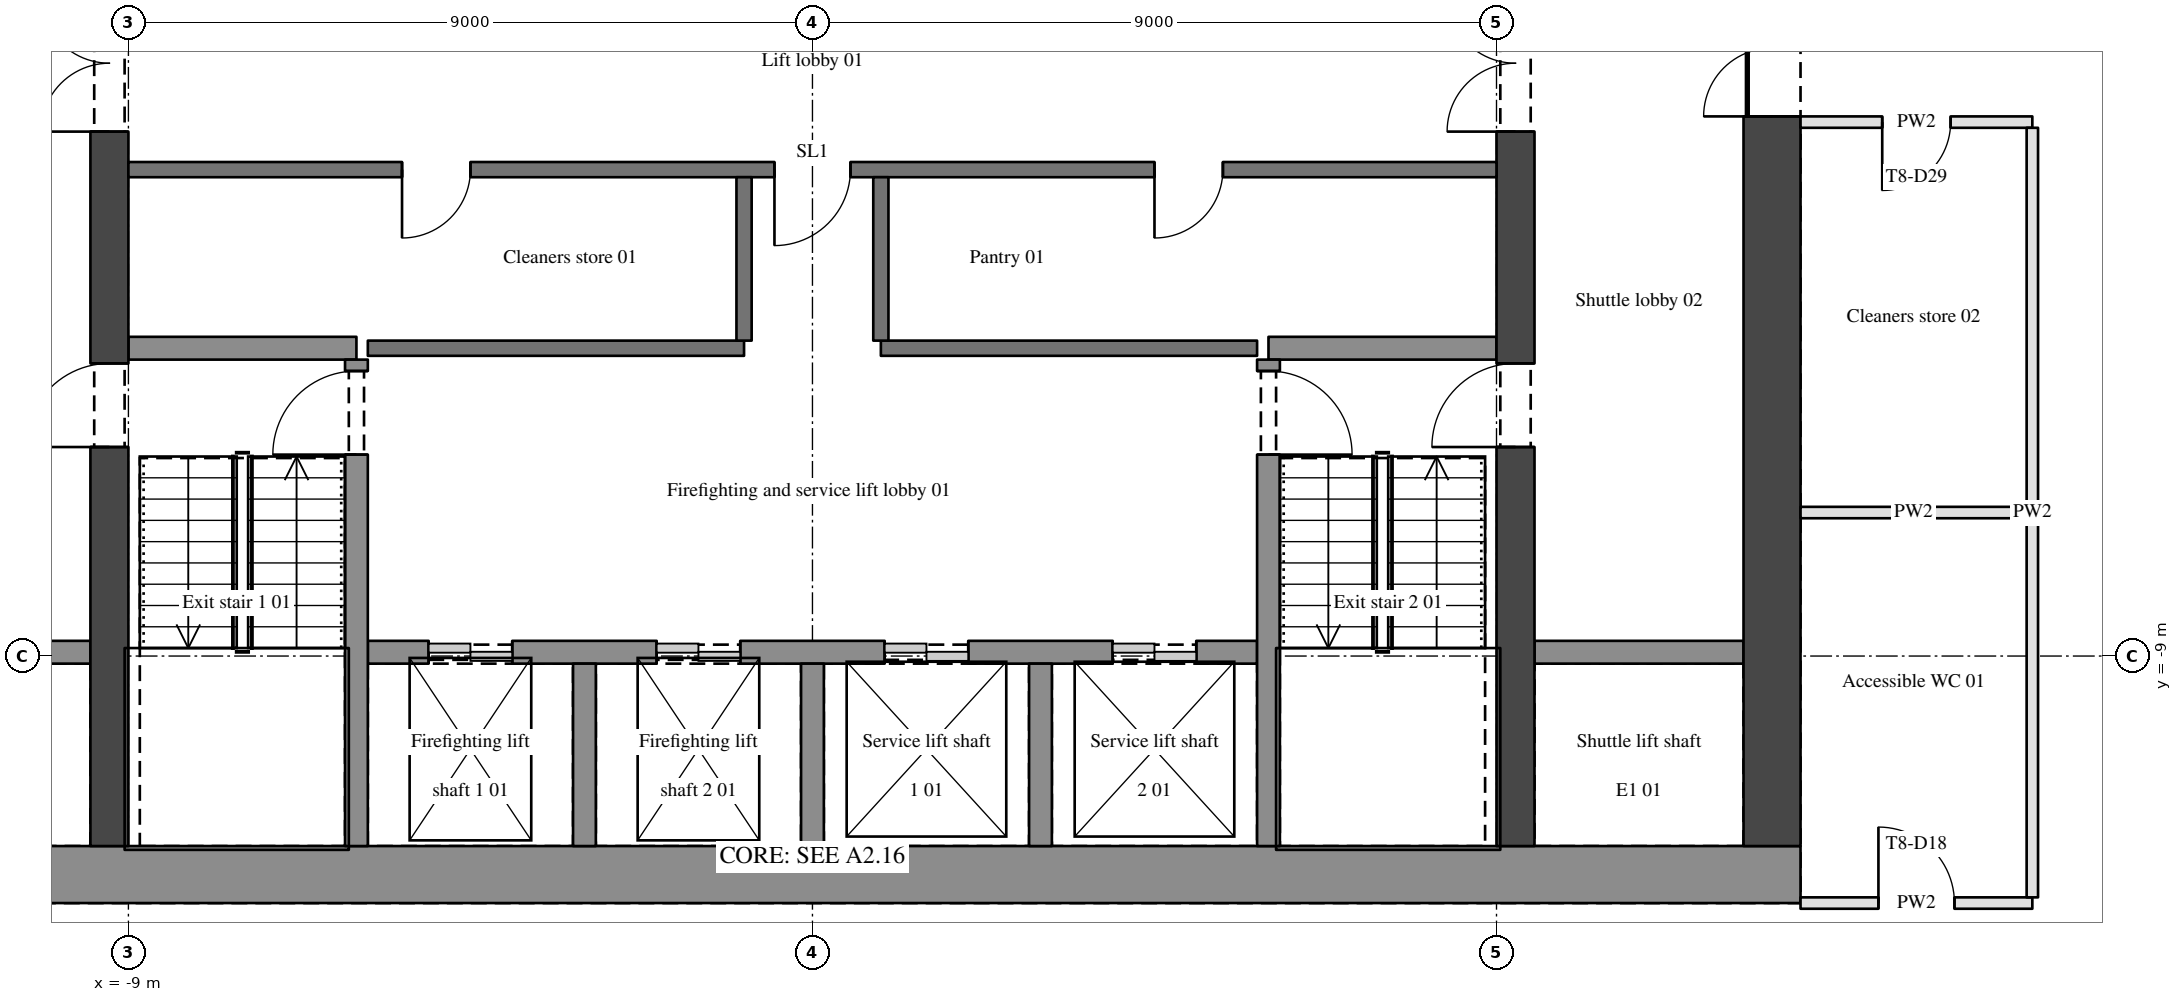
"""IFC4 building model, lengths in metres.
Left out: names, types, materials, properties, quantities, classifications, styles, units other than length and angle.
Written with IfcOpenShell. Run it as: python <this file> out.ifc"""

import sys

from ifc_helpers import new_model, si_unit, direction, frame, frame_2d, origin, place, context, subcontext, project, spatial, rectangle, extrude, element, fill, save


model = new_model("IFC4")
c1 = context("Model", 3, precision=1e-05, world=origin(), true_north=direction((0.0, 1.0)))
c2 = subcontext(c1, "Body", "Model", "MODEL_VIEW")
j1 = project(units=[si_unit("LENGTHUNIT", "METRE"), si_unit("PLANEANGLEUNIT", "RADIAN")], contexts=[c1])
p1 = place(None, origin())
s1 = spatial("IfcSite", under=j1, at=p1, CompositionType="ELEMENT")
p2 = place(p1, origin())
s2 = spatial("IfcBuilding", under=s1, at=p2, CompositionType="ELEMENT")
p3 = place(p2, frame((0.0, 0.0, 121.5)))
s3 = spatial("IfcBuildingStorey", under=s2, at=p3, CompositionType="ELEMENT", Elevation=121.5)
p4 = place(p3, frame((-13.0, -11.875, 0.0), z_axis=(0.0, 0.0, 1.0), x_axis=(1.0, 0.0, 0.0)))
e1 = element("IfcWall", 1, at=p4, inside=s3, PredefinedType="SHEAR", context=c2, shape_type="SweptSolid", body=[
    extrude(rectangle(XDim=26.0, YDim=0.75, at=frame_2d((13.0, 0.0))), origin(), (0.0, 0.0, 1.0), 3.4),
])
p5 = place(p3, frame((12.625, -11.5, 0.0), z_axis=(0.0, 0.0, 1.0), x_axis=(0.0, 1.0, 0.0)))
e2 = element("IfcWall", 2, at=p5, inside=s3, PredefinedType="SHEAR", context=c2, shape_type="SweptSolid", body=[
    extrude(rectangle(XDim=14.65, YDim=0.75, at=frame_2d((7.325, 0.0))), origin(), (0.0, 0.0, 1.0), 3.4),
])
p6 = place(p5, frame((9.6, 0.0, 0.0)))
e3 = element("IfcOpeningElement", 3, at=p6, cuts=e2, PredefinedType="OPENING", context=c2, shape_type="SweptSolid", body=[
    extrude(rectangle(XDim=1.8, YDim=2.1, at=frame_2d((0.9, 1.05))), frame((0.0, 0.385, 0.0), z_axis=(0.0, -1.0, 0.0), x_axis=(1.0, 0.0, 0.0)), (0.0, 0.0, 1.0), 0.77),
])
p7 = place(p3, frame((-9.25, -11.5, 0.0), z_axis=(0.0, 0.0, 1.0), x_axis=(0.0, 1.0, 0.0)))
e4 = element("IfcWall", 4, at=p7, inside=s3, PredefinedType="SHEAR", context=c2, shape_type="SweptSolid", body=[
    extrude(rectangle(XDim=11.65, YDim=0.5, at=frame_2d((5.825, 0.0))), origin(), (0.0, 0.0, 1.0), 3.4),
])
p8 = place(p7, frame((9.4, 0.0, 0.0)))
e5 = element("IfcOpeningElement", 5, at=p8, cuts=e4, PredefinedType="OPENING", context=c2, shape_type="SweptSolid", body=[
    extrude(rectangle(XDim=1.8, YDim=2.1, at=frame_2d((0.9, 1.05))), frame((0.0, 0.26, 0.0), z_axis=(0.0, -1.0, 0.0), x_axis=(1.0, 0.0, 0.0)), (0.0, 0.0, 1.0), 0.52),
])
p9 = place(p7, frame((5.25, 0.0, 0.0)))
e6 = element("IfcOpeningElement", 6, at=p9, cuts=e4, PredefinedType="OPENING", context=c2, shape_type="SweptSolid", body=[
    extrude(rectangle(XDim=1.1, YDim=2.1, at=frame_2d((0.55, 1.05))), frame((0.0, 0.26, 0.0), z_axis=(0.0, -1.0, 0.0), x_axis=(1.0, 0.0, 0.0)), (0.0, 0.0, 1.0), 0.52),
])
p10 = place(p3, frame((9.25, -11.5, 0.0), z_axis=(0.0, 0.0, 1.0), x_axis=(0.0, 1.0, 0.0)))
e7 = element("IfcWall", 7, at=p10, inside=s3, PredefinedType="SHEAR", context=c2, shape_type="SweptSolid", body=[
    extrude(rectangle(XDim=11.65, YDim=0.5, at=frame_2d((5.825, 0.0))), origin(), (0.0, 0.0, 1.0), 3.4),
])
p11 = place(p10, frame((9.4, 0.0, 0.0)))
e8 = element("IfcOpeningElement", 8, at=p11, cuts=e7, PredefinedType="OPENING", context=c2, shape_type="SweptSolid", body=[
    extrude(rectangle(XDim=1.8, YDim=2.1, at=frame_2d((0.9, 1.05))), frame((0.0, 0.26, 0.0), z_axis=(0.0, -1.0, 0.0), x_axis=(1.0, 0.0, 0.0)), (0.0, 0.0, 1.0), 0.52),
])
p12 = place(p10, frame((5.25, 0.0, 0.0)))
e9 = element("IfcOpeningElement", 9, at=p12, cuts=e7, PredefinedType="OPENING", context=c2, shape_type="SweptSolid", body=[
    extrude(rectangle(XDim=1.1, YDim=2.1, at=frame_2d((0.55, 1.05))), frame((0.0, 0.26, 0.0), z_axis=(0.0, -1.0, 0.0), x_axis=(1.0, 0.0, 0.0)), (0.0, 0.0, 1.0), 0.52),
])
p13 = place(p3, frame((13.0, -12.25, 0.0), z_axis=(0.0, 0.0, 1.0), x_axis=(1.0, 0.0, 0.0)))
e10 = element("IfcWall", 10, at=p13, inside=s3, PredefinedType="PARTITIONING", context=c2, shape_type="SweptSolid", body=[
    extrude(rectangle(XDim=3.05, YDim=0.15, at=frame_2d((1.525, 0.0))), origin(), (0.0, 0.0, 1.0), 2.46),
])
p14 = place(p13, frame((1.025, 0.0, 0.0)))
e11 = element("IfcOpeningElement", 11, at=p14, cuts=e10, PredefinedType="OPENING", context=c2, shape_type="SweptSolid", body=[
    extrude(rectangle(XDim=1.0, YDim=2.1, at=frame_2d((0.5, 1.05))), frame((0.0, 0.085, 0.0), z_axis=(0.0, -1.0, 0.0), x_axis=(1.0, 0.0, 0.0)), (0.0, 0.0, 1.0), 0.17),
])
p15 = place(p3, frame((-12.25, -8.95, 0.0), z_axis=(0.0, 0.0, 1.0), x_axis=(1.0, 0.0, 0.0)))
e12 = element("IfcWall", 12, at=p15, inside=s3, PredefinedType="SHEAR", context=c2, shape_type="SweptSolid", body=[
    extrude(rectangle(XDim=2.75, YDim=0.3, at=frame_2d((1.375, 0.0))), origin(), (0.0, 0.0, 1.0), 3.4),
])
p16 = place(p3, frame((-5.85, -8.95, 0.0), z_axis=(0.0, 0.0, 1.0), x_axis=(1.0, 0.0, 0.0)))
e13 = element("IfcWall", 13, at=p16, inside=s3, PredefinedType="SHEAR", context=c2, shape_type="SweptSolid", body=[
    extrude(rectangle(XDim=11.7, YDim=0.3, at=frame_2d((5.85, 0.0))), origin(), (0.0, 0.0, 1.0), 3.4),
])
p17 = place(p16, frame((0.8, 0.0, 0.0)))
e14 = element("IfcOpeningElement", 14, at=p17, cuts=e13, PredefinedType="OPENING", context=c2, shape_type="SweptSolid", body=[
    extrude(rectangle(XDim=1.1, YDim=2.1, at=frame_2d((0.55, 1.05))), frame((0.0, 0.16, 0.0), z_axis=(0.0, -1.0, 0.0), x_axis=(1.0, 0.0, 0.0)), (0.0, 0.0, 1.0), 0.32),
])
p18 = place(p16, frame((3.8, 0.0, 0.0)))
e15 = element("IfcOpeningElement", 15, at=p18, cuts=e13, PredefinedType="OPENING", context=c2, shape_type="SweptSolid", body=[
    extrude(rectangle(XDim=1.1, YDim=2.1, at=frame_2d((0.55, 1.05))), frame((0.0, 0.16, 0.0), z_axis=(0.0, -1.0, 0.0), x_axis=(1.0, 0.0, 0.0)), (0.0, 0.0, 1.0), 0.32),
])
p19 = place(p16, frame((6.8, 0.0, 0.0)))
e16 = element("IfcOpeningElement", 16, at=p19, cuts=e13, PredefinedType="OPENING", context=c2, shape_type="SweptSolid", body=[
    extrude(rectangle(XDim=1.1, YDim=2.1, at=frame_2d((0.55, 1.05))), frame((0.0, 0.16, 0.0), z_axis=(0.0, -1.0, 0.0), x_axis=(1.0, 0.0, 0.0)), (0.0, 0.0, 1.0), 0.32),
])
p20 = place(p16, frame((9.8, 0.0, 0.0)))
e17 = element("IfcOpeningElement", 17, at=p20, cuts=e13, PredefinedType="OPENING", context=c2, shape_type="SweptSolid", body=[
    extrude(rectangle(XDim=1.1, YDim=2.1, at=frame_2d((0.55, 1.05))), frame((0.0, 0.16, 0.0), z_axis=(0.0, -1.0, 0.0), x_axis=(1.0, 0.0, 0.0)), (0.0, 0.0, 1.0), 0.32),
])
p21 = place(p3, frame((9.5, -8.95, 0.0), z_axis=(0.0, 0.0, 1.0), x_axis=(1.0, 0.0, 0.0)))
e18 = element("IfcWall", 18, at=p21, inside=s3, PredefinedType="SHEAR", context=c2, shape_type="SweptSolid", body=[
    extrude(rectangle(XDim=2.75, YDim=0.3, at=frame_2d((1.375, 0.0))), origin(), (0.0, 0.0, 1.0), 3.4),
])
p22 = place(p3, frame((13.0, -7.112, 0.0), z_axis=(0.0, 0.0, 1.0), x_axis=(1.0, 0.0, 0.0)))
e19 = element("IfcWall", 19, at=p22, inside=s3, PredefinedType="PARTITIONING", context=c2, shape_type="SweptSolid", body=[
    extrude(rectangle(XDim=2.975, YDim=0.15, at=frame_2d((1.488, 0.0))), origin(), (0.0, 0.0, 1.0), 2.46),
])
p23 = place(p3, frame((-9.0, -4.95, 0.0), z_axis=(0.0, 0.0, 1.0), x_axis=(1.0, 0.0, 0.0)))
e20 = element("IfcWall", 20, at=p23, inside=s3, PredefinedType="SHEAR", context=c2, shape_type="SweptSolid", body=[
    extrude(rectangle(XDim=3.0, YDim=0.3, at=frame_2d((1.5, 0.0))), origin(), (0.0, 0.0, 1.0), 3.4),
])
for number, where, z_axis, x_axis in (
    (21, (-5.85, -4.95, 0.0), (0.0, 0.0, 1.0), (1.0, 0.0, 0.0)),
    (22, (0.9, -4.95, 0.0), (0.0, 0.0, 1.0), (1.0, 0.0, 0.0)),
):
    element("IfcWall", number, at=place(p3, frame(where, z_axis=z_axis, x_axis=x_axis)), inside=s3, PredefinedType="SOLIDWALL", context=c2, shape_type="SweptSolid", body=[
        extrude(rectangle(XDim=4.95, YDim=0.2, at=frame_2d((2.475, 0.0))), origin(), (0.0, 0.0, 1.0), 3.1),
    ])
p24 = place(p3, frame((6.0, -4.95, 0.0), z_axis=(0.0, 0.0, 1.0), x_axis=(1.0, 0.0, 0.0)))
e23 = element("IfcWall", 23, at=p24, inside=s3, PredefinedType="SHEAR", context=c2, shape_type="SweptSolid", body=[
    extrude(rectangle(XDim=3.0, YDim=0.3, at=frame_2d((1.5, 0.0))), origin(), (0.0, 0.0, 1.0), 3.4),
])
p25 = place(p3, frame((9.0, -2.6, 0.0), z_axis=(0.0, 0.0, 1.0), x_axis=(-1.0, 0.0, 0.0)))
e24 = element("IfcWall", 24, at=p25, inside=s3, PredefinedType="SOLIDWALL", context=c2, shape_type="SweptSolid", body=[
    extrude(rectangle(XDim=18.0, YDim=0.2, at=frame_2d((9.0, 0.0))), origin(), (0.0, 0.0, 1.0), 3.1),
])
p26 = place(p25, frame((8.5, 0.0, 0.0)))
e25 = element("IfcOpeningElement", 25, at=p26, cuts=e24, PredefinedType="OPENING", context=c2, shape_type="SweptSolid", body=[
    extrude(rectangle(XDim=1.0, YDim=2.1, at=frame_2d((0.5, 1.05))), frame((0.0, 0.11, 0.0), z_axis=(0.0, -1.0, 0.0), x_axis=(1.0, 0.0, 0.0)), (0.0, 0.0, 1.0), 0.22),
])
p27 = place(p25, frame((13.5, 0.0, 0.0)))
e26 = element("IfcOpeningElement", 26, at=p27, cuts=e24, PredefinedType="OPENING", context=c2, shape_type="SweptSolid", body=[
    extrude(rectangle(XDim=0.9, YDim=2.1, at=frame_2d((0.45, 1.05))), frame((0.0, 0.11, 0.0), z_axis=(0.0, -1.0, 0.0), x_axis=(1.0, 0.0, 0.0)), (0.0, 0.0, 1.0), 0.22),
])
p28 = place(p25, frame((3.6, 0.0, 0.0)))
e27 = element("IfcOpeningElement", 27, at=p28, cuts=e24, PredefinedType="OPENING", context=c2, shape_type="SweptSolid", body=[
    extrude(rectangle(XDim=0.9, YDim=2.1, at=frame_2d((0.45, 1.05))), frame((0.0, 0.11, 0.0), z_axis=(0.0, -1.0, 0.0), x_axis=(1.0, 0.0, 0.0)), (0.0, 0.0, 1.0), 0.22),
])
p29 = place(p3, frame((16.05, -1.975, 0.0), z_axis=(0.0, 0.0, 1.0), x_axis=(-1.0, 0.0, 0.0)))
e28 = element("IfcWall", 28, at=p29, inside=s3, PredefinedType="PARTITIONING", context=c2, shape_type="SweptSolid", body=[
    extrude(rectangle(XDim=3.05, YDim=0.15, at=frame_2d((1.525, 0.0))), origin(), (0.0, 0.0, 1.0), 2.46),
])
p30 = place(p29, frame((1.075, 0.0, 0.0)))
e29 = element("IfcOpeningElement", 29, at=p30, cuts=e28, PredefinedType="OPENING", context=c2, shape_type="SweptSolid", body=[
    extrude(rectangle(XDim=0.9, YDim=2.1, at=frame_2d((0.45, 1.05))), frame((0.0, 0.085, 0.0), z_axis=(0.0, -1.0, 0.0), x_axis=(1.0, 0.0, 0.0)), (0.0, 0.0, 1.0), 0.17),
])
p31 = place(p3, frame((-6.0, -11.5, 0.0), z_axis=(0.0, 0.0, 1.0), x_axis=(0.0, 1.0, 0.0)))
e30 = element("IfcWall", 30, at=p31, inside=s3, PredefinedType="SHEAR", context=c2, shape_type="SweptSolid", body=[
    extrude(rectangle(XDim=6.4, YDim=0.3, at=frame_2d((3.2, 0.0))), origin(), (0.0, 0.0, 1.0), 3.4),
])
p32 = place(p31, frame((5.15, 0.0, 0.0)))
e31 = element("IfcOpeningElement", 31, at=p32, cuts=e30, PredefinedType="OPENING", context=c2, shape_type="SweptSolid", body=[
    extrude(rectangle(XDim=1.1, YDim=2.1, at=frame_2d((0.55, 1.05))), frame((0.0, 0.16, 0.0), z_axis=(0.0, -1.0, 0.0), x_axis=(1.0, 0.0, 0.0)), (0.0, 0.0, 1.0), 0.32),
])
p33 = place(p3, frame((-3.0, -11.5, 0.0), z_axis=(0.0, 0.0, 1.0), x_axis=(0.0, 1.0, 0.0)))
e32 = element("IfcWall", 32, at=p33, inside=s3, PredefinedType="SHEAR", context=c2, shape_type="SweptSolid", body=[
    extrude(rectangle(XDim=2.4, YDim=0.3, at=frame_2d((1.2, 0.0))), origin(), (0.0, 0.0, 1.0), 3.4),
])
p34 = place(p3, frame((-0.9, -4.85, 0.0), z_axis=(0.0, 0.0, 1.0), x_axis=(0.0, 1.0, 0.0)))
e33 = element("IfcWall", 33, at=p34, inside=s3, PredefinedType="SOLIDWALL", context=c2, shape_type="SweptSolid", body=[
    extrude(rectangle(XDim=2.15, YDim=0.2, at=frame_2d((1.075, 0.0))), origin(), (0.0, 0.0, 1.0), 3.1),
])
p35 = place(p3, frame((0.0, -11.5, 0.0), z_axis=(0.0, 0.0, 1.0), x_axis=(0.0, 1.0, 0.0)))
e34 = element("IfcWall", 34, at=p35, inside=s3, PredefinedType="SHEAR", context=c2, shape_type="SweptSolid", body=[
    extrude(rectangle(XDim=2.4, YDim=0.3, at=frame_2d((1.2, 0.0))), origin(), (0.0, 0.0, 1.0), 3.4),
])
p36 = place(p3, frame((0.9, -4.85, 0.0), z_axis=(0.0, 0.0, 1.0), x_axis=(0.0, 1.0, 0.0)))
e35 = element("IfcWall", 35, at=p36, inside=s3, PredefinedType="SOLIDWALL", context=c2, shape_type="SweptSolid", body=[
    extrude(rectangle(XDim=2.15, YDim=0.2, at=frame_2d((1.075, 0.0))), origin(), (0.0, 0.0, 1.0), 3.1),
])
p37 = place(p3, frame((3.0, -11.5, 0.0), z_axis=(0.0, 0.0, 1.0), x_axis=(0.0, 1.0, 0.0)))
e36 = element("IfcWall", 36, at=p37, inside=s3, PredefinedType="SHEAR", context=c2, shape_type="SweptSolid", body=[
    extrude(rectangle(XDim=2.4, YDim=0.3, at=frame_2d((1.2, 0.0))), origin(), (0.0, 0.0, 1.0), 3.4),
])
p38 = place(p3, frame((6.0, -5.1, 0.0), z_axis=(0.0, 0.0, 1.0), x_axis=(0.0, -1.0, 0.0)))
e37 = element("IfcWall", 37, at=p38, inside=s3, PredefinedType="SHEAR", context=c2, shape_type="SweptSolid", body=[
    extrude(rectangle(XDim=6.4, YDim=0.3, at=frame_2d((3.2, 0.0))), origin(), (0.0, 0.0, 1.0), 3.4),
])
p39 = place(p38, frame((0.15, 0.0, 0.0)))
e38 = element("IfcOpeningElement", 38, at=p39, cuts=e37, PredefinedType="OPENING", context=c2, shape_type="SweptSolid", body=[
    extrude(rectangle(XDim=1.1, YDim=2.1, at=frame_2d((0.55, 1.05))), frame((0.0, 0.16, 0.0), z_axis=(0.0, -1.0, 0.0), x_axis=(1.0, 0.0, 0.0)), (0.0, 0.0, 1.0), 0.32),
])
p40 = place(p3, frame((16.05, -12.175, 0.0), z_axis=(0.0, 0.0, 1.0), x_axis=(0.0, 1.0, 0.0)))
e39 = element("IfcWall", 39, at=p40, inside=s3, PredefinedType="PARTITIONING", context=c2, shape_type="SweptSolid", body=[
    extrude(rectangle(XDim=10.125, YDim=0.15, at=frame_2d((5.062, 0.0))), origin(), (0.0, 0.0, 1.0), 2.46),
])
p41 = place(p6, origin())
e40 = element("IfcDoor", 40, at=p41, inside=s3, OperationType="DOUBLE_DOOR_SINGLE_SWING", PredefinedType="DOOR", context=c2, shape_type="SweptSolid", body=[
    extrude(rectangle(XDim=1.8, YDim=2.1, at=frame_2d((0.9, 1.05))), frame((0.0, 0.025, 0.0), z_axis=(0.0, -1.0, 0.0), x_axis=(1.0, 0.0, 0.0)), (0.0, 0.0, 1.0), 0.05),
])
fill(e3, e40)
p42 = place(p11, origin())
e41 = element("IfcDoor", 41, at=p42, inside=s3, OperationType="DOUBLE_DOOR_SINGLE_SWING", PredefinedType="DOOR", context=c2, shape_type="SweptSolid", body=[
    extrude(rectangle(XDim=1.8, YDim=2.1, at=frame_2d((0.9, 1.05))), frame((0.0, 0.025, 0.0), z_axis=(0.0, -1.0, 0.0), x_axis=(1.0, 0.0, 0.0)), (0.0, 0.0, 1.0), 0.05),
])
fill(e8, e41)
p43 = place(p8, origin())
e42 = element("IfcDoor", 42, at=p43, inside=s3, OperationType="DOUBLE_DOOR_SINGLE_SWING", PredefinedType="DOOR", context=c2, shape_type="SweptSolid", body=[
    extrude(rectangle(XDim=1.8, YDim=2.1, at=frame_2d((0.9, 1.05))), frame((0.0, 0.025, 0.0), z_axis=(0.0, -1.0, 0.0), x_axis=(1.0, 0.0, 0.0)), (0.0, 0.0, 1.0), 0.05),
])
fill(e5, e42)
p44 = place(p26, origin())
e43 = element("IfcDoor", 43, at=p44, inside=s3, OperationType="SINGLE_SWING_RIGHT", PredefinedType="DOOR", context=c2, shape_type="SweptSolid", body=[
    extrude(rectangle(XDim=1.0, YDim=2.1, at=frame_2d((0.5, 1.05))), frame((0.0, 0.025, 0.0), z_axis=(0.0, -1.0, 0.0), x_axis=(1.0, 0.0, 0.0)), (0.0, 0.0, 1.0), 0.05),
])
fill(e25, e43)
p45 = place(p32, origin())
e44 = element("IfcDoor", 44, at=p45, inside=s3, OperationType="SINGLE_SWING_LEFT", PredefinedType="DOOR", context=c2, shape_type="SweptSolid", body=[
    extrude(rectangle(XDim=1.1, YDim=2.1, at=frame_2d((0.55, 1.05))), frame((0.0, 0.025, 0.0), z_axis=(0.0, -1.0, 0.0), x_axis=(1.0, 0.0, 0.0)), (0.0, 0.0, 1.0), 0.05),
])
fill(e31, e44)
p46 = place(p9, origin())
e45 = element("IfcDoor", 45, at=p46, inside=s3, OperationType="SINGLE_SWING_LEFT", PredefinedType="DOOR", context=c2, shape_type="SweptSolid", body=[
    extrude(rectangle(XDim=1.1, YDim=2.1, at=frame_2d((0.55, 1.05))), frame((0.0, 0.025, 0.0), z_axis=(0.0, -1.0, 0.0), x_axis=(1.0, 0.0, 0.0)), (0.0, 0.0, 1.0), 0.05),
])
fill(e6, e45)
p47 = place(p39, origin())
e46 = element("IfcDoor", 46, at=p47, inside=s3, OperationType="SINGLE_SWING_RIGHT", PredefinedType="DOOR", context=c2, shape_type="SweptSolid", body=[
    extrude(rectangle(XDim=1.1, YDim=2.1, at=frame_2d((0.55, 1.05))), frame((0.0, 0.025, 0.0), z_axis=(0.0, -1.0, 0.0), x_axis=(1.0, 0.0, 0.0)), (0.0, 0.0, 1.0), 0.05),
])
fill(e38, e46)
p48 = place(p12, origin())
e47 = element("IfcDoor", 47, at=p48, inside=s3, OperationType="SINGLE_SWING_LEFT", PredefinedType="DOOR", context=c2, shape_type="SweptSolid", body=[
    extrude(rectangle(XDim=1.1, YDim=2.1, at=frame_2d((0.55, 1.05))), frame((0.0, 0.025, 0.0), z_axis=(0.0, -1.0, 0.0), x_axis=(1.0, 0.0, 0.0)), (0.0, 0.0, 1.0), 0.05),
])
fill(e9, e47)
p49 = place(p27, origin())
e48 = element("IfcDoor", 48, at=p49, inside=s3, OperationType="SINGLE_SWING_RIGHT", PredefinedType="DOOR", context=c2, shape_type="SweptSolid", body=[
    extrude(rectangle(XDim=0.9, YDim=2.1, at=frame_2d((0.45, 1.05))), frame((0.0, 0.025, 0.0), z_axis=(0.0, -1.0, 0.0), x_axis=(1.0, 0.0, 0.0)), (0.0, 0.0, 1.0), 0.05),
])
fill(e26, e48)
p50 = place(p28, origin())
e49 = element("IfcDoor", 49, at=p50, inside=s3, OperationType="SINGLE_SWING_RIGHT", PredefinedType="DOOR", context=c2, shape_type="SweptSolid", body=[
    extrude(rectangle(XDim=0.9, YDim=2.1, at=frame_2d((0.45, 1.05))), frame((0.0, 0.025, 0.0), z_axis=(0.0, -1.0, 0.0), x_axis=(1.0, 0.0, 0.0)), (0.0, 0.0, 1.0), 0.05),
])
fill(e27, e49)
p51 = place(p14, origin())
e50 = element("IfcDoor", 50, at=p51, inside=s3, OperationType="SINGLE_SWING_LEFT", PredefinedType="DOOR", context=c2, shape_type="SweptSolid", body=[
    extrude(rectangle(XDim=1.0, YDim=2.1, at=frame_2d((0.5, 1.05))), frame((0.0, 0.025, 0.0), z_axis=(0.0, -1.0, 0.0), x_axis=(1.0, 0.0, 0.0)), (0.0, 0.0, 1.0), 0.05),
])
fill(e11, e50)
p52 = place(p30, origin())
e51 = element("IfcDoor", 51, at=p52, inside=s3, OperationType="SINGLE_SWING_RIGHT", PredefinedType="DOOR", context=c2, shape_type="SweptSolid", body=[
    extrude(rectangle(XDim=0.9, YDim=2.1, at=frame_2d((0.45, 1.05))), frame((0.0, 0.025, 0.0), z_axis=(0.0, -1.0, 0.0), x_axis=(1.0, 0.0, 0.0)), (0.0, 0.0, 1.0), 0.05),
])
fill(e29, e51)
p53 = place(p17, origin())
e52 = element("IfcDoor", 52, at=p53, inside=s3, OperationType="DOUBLE_DOOR_SLIDING", PredefinedType="DOOR", context=c2, shape_type="SweptSolid", body=[
    extrude(rectangle(XDim=1.1, YDim=2.1, at=frame_2d((0.55, 1.05))), frame((0.0, 0.025, 0.0), z_axis=(0.0, -1.0, 0.0), x_axis=(1.0, 0.0, 0.0)), (0.0, 0.0, 1.0), 0.05),
])
fill(e14, e52)
p54 = place(p18, origin())
e53 = element("IfcDoor", 53, at=p54, inside=s3, OperationType="DOUBLE_DOOR_SLIDING", PredefinedType="DOOR", context=c2, shape_type="SweptSolid", body=[
    extrude(rectangle(XDim=1.1, YDim=2.1, at=frame_2d((0.55, 1.05))), frame((0.0, 0.025, 0.0), z_axis=(0.0, -1.0, 0.0), x_axis=(1.0, 0.0, 0.0)), (0.0, 0.0, 1.0), 0.05),
])
fill(e15, e53)
p55 = place(p19, origin())
e54 = element("IfcDoor", 54, at=p55, inside=s3, OperationType="DOUBLE_DOOR_SLIDING", PredefinedType="DOOR", context=c2, shape_type="SweptSolid", body=[
    extrude(rectangle(XDim=1.1, YDim=2.1, at=frame_2d((0.55, 1.05))), frame((0.0, 0.025, 0.0), z_axis=(0.0, -1.0, 0.0), x_axis=(1.0, 0.0, 0.0)), (0.0, 0.0, 1.0), 0.05),
])
fill(e16, e54)
p56 = place(p20, origin())
e55 = element("IfcDoor", 55, at=p56, inside=s3, OperationType="DOUBLE_DOOR_SLIDING", PredefinedType="DOOR", context=c2, shape_type="SweptSolid", body=[
    extrude(rectangle(XDim=1.1, YDim=2.1, at=frame_2d((0.55, 1.05))), frame((0.0, 0.025, 0.0), z_axis=(0.0, -1.0, 0.0), x_axis=(1.0, 0.0, 0.0)), (0.0, 0.0, 1.0), 0.05),
])
fill(e17, e55)
save(model, sys.argv[1])
